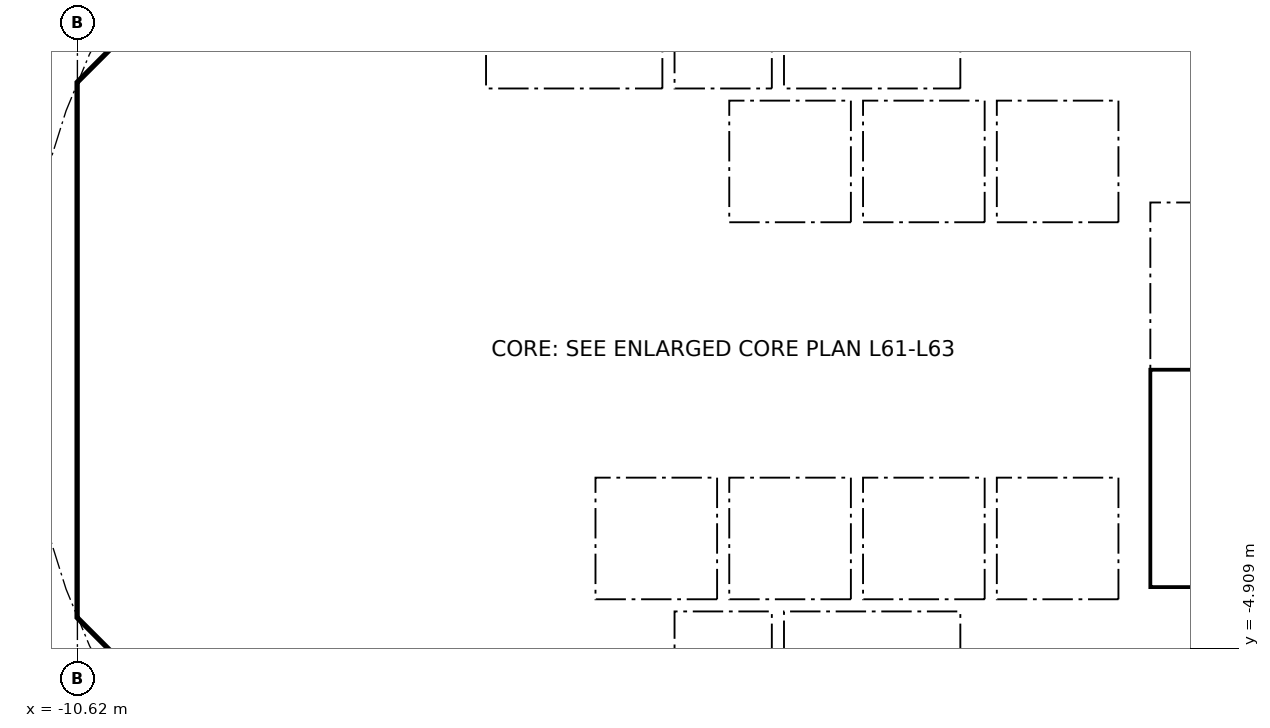
"""IFC4 building model, lengths in metres.
Left out: names, types, materials, properties, quantities, classifications, styles, units other than length and angle.
Written with IfcOpenShell. Run it as: python <this file> out.ifc"""

import sys

from ifc_helpers import new_model, si_unit, direction, frame, frame_2d, origin, place, context, subcontext, project, spatial, polyline, rectangle, outline, extrude, element, fill, save


model = new_model("IFC4")
c1 = context("Model", 3, precision=1e-05, world=origin(), true_north=direction((0.0, 1.0)))
c2 = subcontext(c1, "Body", "Model", "MODEL_VIEW")
j1 = project(units=[si_unit("LENGTHUNIT", "METRE"), si_unit("PLANEANGLEUNIT", "RADIAN")], contexts=[c1])
p1 = place(None, origin())
s1 = spatial("IfcSite", under=j1, at=p1, CompositionType="ELEMENT")
p2 = place(p1, origin())
s2 = spatial("IfcBuilding", under=s1, at=p2, CompositionType="ELEMENT")
p3 = place(p2, frame((0.0, 0.0, 245.5)))
s3 = spatial("IfcBuildingStorey", under=s2, at=p3, CompositionType="ELEMENT", Elevation=245.5)
p4 = place(p3, frame((9.988, 4.613, 0.0), z_axis=(0.0, 0.0, 1.0), x_axis=(-0.707106781187, 0.707106781187, 0.0)))
e1 = element("IfcWall", 1, at=p4, inside=s3, PredefinedType="SHEAR", context=c2, shape_type="SweptSolid", body=[
    extrude(rectangle(XDim=7.602, YDim=0.6, at=frame_2d((3.801, 0.0))), origin(), (0.0, 0.0, 1.0), 3.44),
])
p5 = place(p4, frame((3.201, 0.0, 0.0)))
e2 = element("IfcOpeningElement", 2, at=p5, cuts=e1, PredefinedType="OPENING", context=c2, shape_type="SweptSolid", body=[
    extrude(rectangle(XDim=1.2, YDim=2.1, at=frame_2d((0.6, 1.05))), frame((0.0, 0.31, 0.0), z_axis=(0.0, -1.0, 0.0), x_axis=(1.0, 0.0, 0.0)), (0.0, 0.0, 1.0), 0.62),
])
p6 = place(p3, frame((-4.613, 9.988, 0.0), z_axis=(0.0, 0.0, 1.0), x_axis=(-0.707106781187, -0.707106781187, 0.0)))
e3 = element("IfcWall", 3, at=p6, inside=s3, PredefinedType="SHEAR", context=c2, shape_type="SweptSolid", body=[
    extrude(rectangle(XDim=7.602, YDim=0.6, at=frame_2d((3.801, 0.0))), origin(), (0.0, 0.0, 1.0), 3.44),
])
p7 = place(p6, frame((0.351, 0.0, 0.0)))
e4 = element("IfcOpeningElement", 4, at=p7, cuts=e3, PredefinedType="OPENING", context=c2, shape_type="SweptSolid", body=[
    extrude(rectangle(XDim=1.1, YDim=2.1, at=frame_2d((0.55, 1.05))), frame((0.0, 0.31, 0.0), z_axis=(0.0, -1.0, 0.0), x_axis=(1.0, 0.0, 0.0)), (0.0, 0.0, 1.0), 0.62),
])
p8 = place(p3, frame((-10.325, 3.801, 0.0), z_axis=(0.0, 0.0, 1.0), x_axis=(0.0, -1.0, 0.0)))
e5 = element("IfcWall", 5, at=p8, inside=s3, PredefinedType="SHEAR", context=c2, shape_type="SweptSolid", body=[
    extrude(rectangle(XDim=7.602, YDim=0.6, at=frame_2d((3.801, 0.0))), origin(), (0.0, 0.0, 1.0), 3.44),
])
p9 = place(p8, frame((0.651, 0.0, 0.0)))
e6 = element("IfcOpeningElement", 6, at=p9, cuts=e5, PredefinedType="OPENING", context=c2, shape_type="SweptSolid", body=[
    extrude(rectangle(XDim=1.5, YDim=2.1, at=frame_2d((0.75, 1.05))), frame((0.0, 0.31, 0.0), z_axis=(0.0, -1.0, 0.0), x_axis=(1.0, 0.0, 0.0)), (0.0, 0.0, 1.0), 0.62),
])
p10 = place(p8, frame((5.451, 0.0, 0.0)))
e7 = element("IfcOpeningElement", 7, at=p10, cuts=e5, PredefinedType="OPENING", context=c2, shape_type="SweptSolid", body=[
    extrude(rectangle(XDim=1.5, YDim=2.1, at=frame_2d((0.75, 1.05))), frame((0.0, 0.31, 0.0), z_axis=(0.0, -1.0, 0.0), x_axis=(1.0, 0.0, 0.0)), (0.0, 0.0, 1.0), 0.62),
])
p11 = place(p3, frame((-9.988, -4.613, 0.0), z_axis=(0.0, 0.0, 1.0), x_axis=(0.707106781187, -0.707106781187, 0.0)))
e8 = element("IfcWall", 8, at=p11, inside=s3, PredefinedType="SHEAR", context=c2, shape_type="SweptSolid", body=[
    extrude(rectangle(XDim=7.602, YDim=0.6, at=frame_2d((3.801, 0.0))), origin(), (0.0, 0.0, 1.0), 3.44),
])
p12 = place(p11, frame((6.151, 0.0, 0.0)))
e9 = element("IfcOpeningElement", 9, at=p12, cuts=e8, PredefinedType="OPENING", context=c2, shape_type="SweptSolid", body=[
    extrude(rectangle(XDim=1.1, YDim=2.1, at=frame_2d((0.55, 1.05))), frame((0.0, 0.31, 0.0), z_axis=(0.0, -1.0, 0.0), x_axis=(1.0, 0.0, 0.0)), (0.0, 0.0, 1.0), 0.62),
])
p13 = place(p3, frame((4.613, -9.988, 0.0), z_axis=(0.0, 0.0, 1.0), x_axis=(0.707106781187, 0.707106781187, 0.0)))
e10 = element("IfcWall", 10, at=p13, inside=s3, PredefinedType="SHEAR", context=c2, shape_type="SweptSolid", body=[
    extrude(rectangle(XDim=7.602, YDim=0.6, at=frame_2d((3.801, 0.0))), origin(), (0.0, 0.0, 1.0), 3.44),
])
p14 = place(p13, frame((3.201, 0.0, 0.0)))
e11 = element("IfcOpeningElement", 11, at=p14, cuts=e10, PredefinedType="OPENING", context=c2, shape_type="SweptSolid", body=[
    extrude(rectangle(XDim=1.2, YDim=2.1, at=frame_2d((0.6, 1.05))), frame((0.0, 0.31, 0.0), z_axis=(0.0, -1.0, 0.0), x_axis=(1.0, 0.0, 0.0)), (0.0, 0.0, 1.0), 0.62),
])
p15 = place(p3, frame((-5.8, 4.3, 0.0), z_axis=(0.0, 0.0, 1.0), x_axis=(0.0, 1.0, 0.0)))
e12 = element("IfcWall", 12, at=p15, inside=s3, PredefinedType="PARTITIONING", context=c2, shape_type="SweptSolid", body=[
    extrude(rectangle(XDim=3.927, YDim=0.15, at=frame_2d((1.963, 0.0))), origin(), (0.0, 0.0, 1.0), 3.44),
])
p16 = place(p15, frame((0.413, 0.0, 0.0)))
e13 = element("IfcOpeningElement", 13, at=p16, cuts=e12, PredefinedType="OPENING", context=c2, shape_type="SweptSolid", body=[
    extrude(rectangle(XDim=0.9, YDim=2.1, at=frame_2d((0.45, 1.05))), frame((0.0, 0.085, 0.0), z_axis=(0.0, -1.0, 0.0), x_axis=(1.0, 0.0, 0.0)), (0.0, 0.0, 1.0), 0.17),
])
p17 = place(p15, frame((2.489, 0.0, 0.0)))
e14 = element("IfcOpeningElement", 14, at=p17, cuts=e12, PredefinedType="OPENING", context=c2, shape_type="SweptSolid", body=[
    extrude(rectangle(XDim=0.9, YDim=2.1, at=frame_2d((0.45, 1.05))), frame((0.0, 0.085, 0.0), z_axis=(0.0, -1.0, 0.0), x_axis=(1.0, 0.0, 0.0)), (0.0, 0.0, 1.0), 0.17),
])
p18 = place(p3, frame((4.0, 4.3, 0.0), z_axis=(0.0, 0.0, 1.0), x_axis=(0.0, 1.0, 0.0)))
e15 = element("IfcWall", 15, at=p18, inside=s3, PredefinedType="SOLIDWALL", context=c2, shape_type="SweptSolid", body=[
    extrude(rectangle(XDim=2.2, YDim=0.2, at=frame_2d((1.1, 0.0))), origin(), (0.0, 0.0, 1.0), 3.44),
])
p19 = place(p18, frame((0.55, 0.0, 0.0)))
e16 = element("IfcOpeningElement", 16, at=p19, cuts=e15, PredefinedType="OPENING", context=c2, shape_type="SweptSolid", body=[
    extrude(rectangle(XDim=1.1, YDim=2.1, at=frame_2d((0.55, 1.05))), frame((0.0, 0.11, 0.0), z_axis=(0.0, -1.0, 0.0), x_axis=(1.0, 0.0, 0.0)), (0.0, 0.0, 1.0), 0.22),
])
p20 = place(p3, frame((-4.0, 4.3, 0.0), z_axis=(0.0, 0.0, 1.0), x_axis=(0.0, 1.0, 0.0)))
e17 = element("IfcWall", 17, at=p20, inside=s3, PredefinedType="SOLIDWALL", context=c2, shape_type="SweptSolid", body=[
    extrude(rectangle(XDim=2.2, YDim=0.2, at=frame_2d((1.1, 0.0))), origin(), (0.0, 0.0, 1.0), 3.44),
])
p21 = place(p20, frame((0.55, 0.0, 0.0)))
e18 = element("IfcOpeningElement", 18, at=p21, cuts=e17, PredefinedType="OPENING", context=c2, shape_type="SweptSolid", body=[
    extrude(rectangle(XDim=1.1, YDim=2.1, at=frame_2d((0.55, 1.05))), frame((0.0, 0.11, 0.0), z_axis=(0.0, -1.0, 0.0), x_axis=(1.0, 0.0, 0.0)), (0.0, 0.0, 1.0), 0.22),
])
p22 = place(p3, frame((-6.7, 2.0, 0.0), z_axis=(0.0, 0.0, 1.0), x_axis=(1.0, 0.0, 0.0)))
e19 = element("IfcWall", 19, at=p22, inside=s3, PredefinedType="SOLIDWALL", context=c2, shape_type="SweptSolid", body=[
    extrude(rectangle(XDim=13.4, YDim=0.2, at=frame_2d((6.7, 0.0))), origin(), (0.0, 0.0, 1.0), 3.44),
])
p23 = place(p22, frame((7.25, 0.0, 0.0)))
e20 = element("IfcOpeningElement", 20, at=p23, cuts=e19, PredefinedType="OPENING", context=c2, shape_type="SweptSolid", body=[
    extrude(rectangle(XDim=1.1, YDim=2.1, at=frame_2d((0.55, 1.05))), frame((0.0, 0.11, 0.0), z_axis=(0.0, -1.0, 0.0), x_axis=(1.0, 0.0, 0.0)), (0.0, 0.0, 1.0), 0.22),
])
p24 = place(p22, frame((9.45, 0.0, 0.0)))
e21 = element("IfcOpeningElement", 21, at=p24, cuts=e19, PredefinedType="OPENING", context=c2, shape_type="SweptSolid", body=[
    extrude(rectangle(XDim=1.1, YDim=2.1, at=frame_2d((0.55, 1.05))), frame((0.0, 0.11, 0.0), z_axis=(0.0, -1.0, 0.0), x_axis=(1.0, 0.0, 0.0)), (0.0, 0.0, 1.0), 0.22),
])
p25 = place(p22, frame((0.75, 0.0, 0.0)))
e22 = element("IfcOpeningElement", 22, at=p25, cuts=e19, PredefinedType="OPENING", context=c2, shape_type="SweptSolid", body=[
    extrude(rectangle(XDim=0.9, YDim=2.1, at=frame_2d((0.45, 1.05))), frame((0.0, 0.11, 0.0), z_axis=(0.0, -1.0, 0.0), x_axis=(1.0, 0.0, 0.0)), (0.0, 0.0, 1.0), 0.22),
])
p26 = place(p22, frame((4.05, 0.0, 0.0)))
e23 = element("IfcOpeningElement", 23, at=p26, cuts=e19, PredefinedType="OPENING", context=c2, shape_type="SweptSolid", body=[
    extrude(rectangle(XDim=0.9, YDim=2.1, at=frame_2d((0.45, 1.05))), frame((0.0, 0.11, 0.0), z_axis=(0.0, -1.0, 0.0), x_axis=(1.0, 0.0, 0.0)), (0.0, 0.0, 1.0), 0.22),
])
p27 = place(p3, frame((6.7, 4.0, 0.0), z_axis=(0.0, 0.0, 1.0), x_axis=(1.0, 0.0, 0.0)))
e24 = element("IfcWall", 24, at=p27, inside=s3, PredefinedType="SOLIDWALL", context=c2, shape_type="SweptSolid", body=[
    extrude(rectangle(XDim=3.325, YDim=0.2, at=frame_2d((1.662, 0.0))), origin(), (0.0, 0.0, 1.0), 3.44),
])
p28 = place(p27, frame((1.25, 0.0, 0.0)))
e25 = element("IfcOpeningElement", 25, at=p28, cuts=e24, PredefinedType="OPENING", context=c2, shape_type="SweptSolid", body=[
    extrude(rectangle(XDim=1.1, YDim=2.1, at=frame_2d((0.55, 1.05))), frame((0.0, 0.11, 0.0), z_axis=(0.0, -1.0, 0.0), x_axis=(1.0, 0.0, 0.0)), (0.0, 0.0, 1.0), 0.22),
])
p29 = place(p3, frame((-5.8, -8.227, 0.0), z_axis=(0.0, 0.0, 1.0), x_axis=(0.0, 1.0, 0.0)))
e26 = element("IfcWall", 26, at=p29, inside=s3, PredefinedType="PARTITIONING", context=c2, shape_type="SweptSolid", body=[
    extrude(rectangle(XDim=3.927, YDim=0.15, at=frame_2d((1.963, 0.0))), origin(), (0.0, 0.0, 1.0), 3.44),
])
p30 = place(p29, frame((2.615, 0.0, 0.0)))
e27 = element("IfcOpeningElement", 27, at=p30, cuts=e26, PredefinedType="OPENING", context=c2, shape_type="SweptSolid", body=[
    extrude(rectangle(XDim=0.9, YDim=2.1, at=frame_2d((0.45, 1.05))), frame((0.0, 0.085, 0.0), z_axis=(0.0, -1.0, 0.0), x_axis=(1.0, 0.0, 0.0)), (0.0, 0.0, 1.0), 0.17),
])
p31 = place(p29, frame((0.539, 0.0, 0.0)))
e28 = element("IfcOpeningElement", 28, at=p31, cuts=e26, PredefinedType="OPENING", context=c2, shape_type="SweptSolid", body=[
    extrude(rectangle(XDim=0.9, YDim=2.1, at=frame_2d((0.45, 1.05))), frame((0.0, 0.085, 0.0), z_axis=(0.0, -1.0, 0.0), x_axis=(1.0, 0.0, 0.0)), (0.0, 0.0, 1.0), 0.17),
])
p32 = place(p3, frame((4.0, -6.5, 0.0), z_axis=(0.0, 0.0, 1.0), x_axis=(0.0, 1.0, 0.0)))
e29 = element("IfcWall", 29, at=p32, inside=s3, PredefinedType="SOLIDWALL", context=c2, shape_type="SweptSolid", body=[
    extrude(rectangle(XDim=2.2, YDim=0.2, at=frame_2d((1.1, 0.0))), origin(), (0.0, 0.0, 1.0), 3.44),
])
p33 = place(p32, frame((0.55, 0.0, 0.0)))
e30 = element("IfcOpeningElement", 30, at=p33, cuts=e29, PredefinedType="OPENING", context=c2, shape_type="SweptSolid", body=[
    extrude(rectangle(XDim=1.1, YDim=2.1, at=frame_2d((0.55, 1.05))), frame((0.0, 0.11, 0.0), z_axis=(0.0, -1.0, 0.0), x_axis=(1.0, 0.0, 0.0)), (0.0, 0.0, 1.0), 0.22),
])
p34 = place(p3, frame((-4.0, -6.5, 0.0), z_axis=(0.0, 0.0, 1.0), x_axis=(0.0, 1.0, 0.0)))
e31 = element("IfcWall", 31, at=p34, inside=s3, PredefinedType="SOLIDWALL", context=c2, shape_type="SweptSolid", body=[
    extrude(rectangle(XDim=2.2, YDim=0.2, at=frame_2d((1.1, 0.0))), origin(), (0.0, 0.0, 1.0), 3.44),
])
p35 = place(p34, frame((0.65, 0.0, 0.0)))
e32 = element("IfcOpeningElement", 32, at=p35, cuts=e31, PredefinedType="OPENING", context=c2, shape_type="SweptSolid", body=[
    extrude(rectangle(XDim=0.9, YDim=2.1, at=frame_2d((0.45, 1.05))), frame((0.0, 0.11, 0.0), z_axis=(0.0, -1.0, 0.0), x_axis=(1.0, 0.0, 0.0)), (0.0, 0.0, 1.0), 0.22),
])
p36 = place(p3, frame((-6.7, -2.0, 0.0), z_axis=(0.0, 0.0, 1.0), x_axis=(1.0, 0.0, 0.0)))
e33 = element("IfcWall", 33, at=p36, inside=s3, PredefinedType="SOLIDWALL", context=c2, shape_type="SweptSolid", body=[
    extrude(rectangle(XDim=13.4, YDim=0.2, at=frame_2d((6.7, 0.0))), origin(), (0.0, 0.0, 1.0), 3.44),
])
p37 = place(p36, frame((5.05, 0.0, 0.0)))
e34 = element("IfcOpeningElement", 34, at=p37, cuts=e33, PredefinedType="OPENING", context=c2, shape_type="SweptSolid", body=[
    extrude(rectangle(XDim=1.1, YDim=2.1, at=frame_2d((0.55, 1.05))), frame((0.0, 0.11, 0.0), z_axis=(0.0, -1.0, 0.0), x_axis=(1.0, 0.0, 0.0)), (0.0, 0.0, 1.0), 0.22),
])
p38 = place(p36, frame((7.25, 0.0, 0.0)))
e35 = element("IfcOpeningElement", 35, at=p38, cuts=e33, PredefinedType="OPENING", context=c2, shape_type="SweptSolid", body=[
    extrude(rectangle(XDim=1.1, YDim=2.1, at=frame_2d((0.55, 1.05))), frame((0.0, 0.11, 0.0), z_axis=(0.0, -1.0, 0.0), x_axis=(1.0, 0.0, 0.0)), (0.0, 0.0, 1.0), 0.22),
])
p39 = place(p36, frame((1.85, 0.0, 0.0)))
e36 = element("IfcOpeningElement", 36, at=p39, cuts=e33, PredefinedType="OPENING", context=c2, shape_type="SweptSolid", body=[
    extrude(rectangle(XDim=0.9, YDim=2.1, at=frame_2d((0.45, 1.05))), frame((0.0, 0.11, 0.0), z_axis=(0.0, -1.0, 0.0), x_axis=(1.0, 0.0, 0.0)), (0.0, 0.0, 1.0), 0.22),
])
p40 = place(p3, origin())
e37 = element("IfcWall", 37, at=p40, inside=s3, PredefinedType="SHEAR", context=c2, shape_type="SweptSolid", body=[
    extrude(outline(polyline([(-10.625, -3.801), (-10.025, -3.801), (-10.025, -4.152), (-9.776, -4.401), (-10.2, -4.825), (-10.625, -4.401), (-10.625, -3.801)])), origin(), (0.0, 0.0, 1.0), 3.44),
])
p41 = place(p3, origin())
e38 = element("IfcWall", 38, at=p41, inside=s3, PredefinedType="SHEAR", context=c2, shape_type="SweptSolid", body=[
    extrude(outline(polyline([(-10.2, 4.825), (-9.776, 4.401), (-10.025, 4.152), (-10.025, 3.801), (-10.625, 3.801), (-10.625, 4.401), (-10.2, 4.825)])), origin(), (0.0, 0.0, 1.0), 3.44),
])
for number, where, z_axis, x_axis in (
    (39, (-10.025, -4.0, 0.0), (0.0, 0.0, 1.0), (1.0, 0.0, 0.0)),
    (40, (-10.025, 4.0, 0.0), (0.0, 0.0, 1.0), (1.0, 0.0, 0.0)),
):
    element("IfcWall", number, at=place(p3, frame(where, z_axis=z_axis, x_axis=x_axis)), inside=s3, PredefinedType="PARTITIONING", context=c2, shape_type="SweptSolid", body=[
        extrude(rectangle(XDim=3.325, YDim=0.2, at=frame_2d((1.662, 0.0))), origin(), (0.0, 0.0, 1.0), 3.44),
    ])
for number, where, z_axis, x_axis in (
    (41, (-0.9, 4.3, 0.0), (0.0, 0.0, 1.0), (0.0, 1.0, 0.0)),
    (42, (0.9, 4.3, 0.0), (0.0, 0.0, 1.0), (0.0, 1.0, 0.0)),
):
    element("IfcWall", number, at=place(p3, frame(where, z_axis=z_axis, x_axis=x_axis)), inside=s3, PredefinedType="SOLIDWALL", context=c2, shape_type="SweptSolid", body=[
        extrude(rectangle(XDim=2.2, YDim=0.2, at=frame_2d((1.1, 0.0))), origin(), (0.0, 0.0, 1.0), 3.44),
    ])
p42 = place(p3, origin())
e43 = element("IfcWall", 43, at=p42, inside=s3, PredefinedType="SOLIDWALL", context=c2, shape_type="SweptSolid", body=[
    extrude(outline(polyline([(-6.7, 4.3), (6.7, 4.3), (6.7, 2.1), (6.5, 2.1), (6.5, 4.1), (4.5, 4.1), (4.5, 2.1), (4.3, 2.1), (4.3, 4.1), (2.3, 4.1), (2.3, 2.1), (2.1, 2.1), (2.1, 4.1), (0.1, 4.1), (0.1, 2.1), (-0.1, 2.1), (-0.1, 4.1), (-4.3, 4.1), (-4.3, 2.1), (-4.5, 2.1), (-4.5, 4.1), (-6.5, 4.1), (-6.5, 2.1), (-6.7, 2.1), (-6.7, 4.3)])), origin(), (0.0, 0.0, 1.0), 3.44),
])
for number, where, z_axis, x_axis in (
    (44, (-0.9, -6.5, 0.0), (0.0, 0.0, 1.0), (0.0, 1.0, 0.0)),
    (45, (0.9, -6.5, 0.0), (0.0, 0.0, 1.0), (0.0, 1.0, 0.0)),
):
    element("IfcWall", number, at=place(p3, frame(where, z_axis=z_axis, x_axis=x_axis)), inside=s3, PredefinedType="SOLIDWALL", context=c2, shape_type="SweptSolid", body=[
        extrude(rectangle(XDim=2.2, YDim=0.2, at=frame_2d((1.1, 0.0))), origin(), (0.0, 0.0, 1.0), 3.44),
    ])
p43 = place(p3, origin())
e46 = element("IfcWall", 46, at=p43, inside=s3, PredefinedType="SOLIDWALL", context=c2, shape_type="SweptSolid", body=[
    extrude(outline(polyline([(-6.7, -2.1), (-6.5, -2.1), (-6.5, -4.1), (-2.3, -4.1), (-2.3, -2.1), (-2.1, -2.1), (-2.1, -4.1), (-0.1, -4.1), (-0.1, -2.1), (0.1, -2.1), (0.1, -4.1), (2.1, -4.1), (2.1, -2.1), (2.3, -2.1), (2.3, -4.1), (4.3, -4.1), (4.3, -2.1), (4.5, -2.1), (4.5, -4.1), (6.5, -4.1), (6.5, -2.1), (6.7, -2.1), (6.7, -4.3), (-6.7, -4.3), (-6.7, -2.1)])), origin(), (0.0, 0.0, 1.0), 3.44),
])
p44 = place(p3, origin())
e47 = element("IfcWall", 47, at=p44, inside=s3, PredefinedType="SOLIDWALL", context=c2, shape_type="SweptSolid", body=[
    extrude(outline(polyline([(7.025, -3.9), (6.7, -3.9), (6.7, 3.9), (7.025, 3.9), (7.025, -3.9)])), origin(), (0.0, 0.0, 1.0), 3.44),
])
p45 = place(p3, origin())
e48 = element("IfcWall", 48, at=p45, inside=s3, PredefinedType="SOLIDWALL", context=c2, shape_type="SweptSolid", body=[
    extrude(outline(polyline([(10.025, -4.1), (6.7, -4.1), (6.7, -3.9), (10.025, -3.9), (10.025, -4.1)])), origin(), (0.0, 0.0, 1.0), 3.44),
])
p46 = place(p23, origin())
e49 = element("IfcDoor", 49, at=p46, inside=s3, OperationType="DOUBLE_DOOR_SLIDING", PredefinedType="DOOR", context=c2, shape_type="SweptSolid", body=[
    extrude(rectangle(XDim=1.1, YDim=2.1, at=frame_2d((0.55, 1.05))), frame((0.0, 0.025, 0.0), z_axis=(0.0, -1.0, 0.0), x_axis=(1.0, 0.0, 0.0)), (0.0, 0.0, 1.0), 0.05),
])
fill(e20, e49)
p47 = place(p24, origin())
e50 = element("IfcDoor", 50, at=p47, inside=s3, OperationType="DOUBLE_DOOR_SLIDING", PredefinedType="DOOR", context=c2, shape_type="SweptSolid", body=[
    extrude(rectangle(XDim=1.1, YDim=2.1, at=frame_2d((0.55, 1.05))), frame((0.0, 0.025, 0.0), z_axis=(0.0, -1.0, 0.0), x_axis=(1.0, 0.0, 0.0)), (0.0, 0.0, 1.0), 0.05),
])
fill(e21, e50)
p48 = place(p37, origin())
e51 = element("IfcDoor", 51, at=p48, inside=s3, OperationType="DOUBLE_DOOR_SLIDING", PredefinedType="DOOR", context=c2, shape_type="SweptSolid", body=[
    extrude(rectangle(XDim=1.1, YDim=2.1, at=frame_2d((0.55, 1.05))), frame((0.0, 0.025, 0.0), z_axis=(0.0, -1.0, 0.0), x_axis=(1.0, 0.0, 0.0)), (0.0, 0.0, 1.0), 0.05),
])
fill(e34, e51)
p49 = place(p38, origin())
e52 = element("IfcDoor", 52, at=p49, inside=s3, OperationType="DOUBLE_DOOR_SLIDING", PredefinedType="DOOR", context=c2, shape_type="SweptSolid", body=[
    extrude(rectangle(XDim=1.1, YDim=2.1, at=frame_2d((0.55, 1.05))), frame((0.0, 0.025, 0.0), z_axis=(0.0, -1.0, 0.0), x_axis=(1.0, 0.0, 0.0)), (0.0, 0.0, 1.0), 0.05),
])
fill(e35, e52)
p50 = place(p19, origin())
e53 = element("IfcDoor", 53, at=p50, inside=s3, OperationType="DOUBLE_DOOR_SLIDING", PredefinedType="DOOR", context=c2, shape_type="SweptSolid", body=[
    extrude(rectangle(XDim=1.1, YDim=2.1, at=frame_2d((0.55, 1.05))), frame((0.0, 0.025, 0.0), z_axis=(0.0, -1.0, 0.0), x_axis=(1.0, 0.0, 0.0)), (0.0, 0.0, 1.0), 0.05),
])
fill(e16, e53)
p51 = place(p33, origin())
e54 = element("IfcDoor", 54, at=p51, inside=s3, OperationType="DOUBLE_DOOR_SLIDING", PredefinedType="DOOR", context=c2, shape_type="SweptSolid", body=[
    extrude(rectangle(XDim=1.1, YDim=2.1, at=frame_2d((0.55, 1.05))), frame((0.0, 0.025, 0.0), z_axis=(0.0, -1.0, 0.0), x_axis=(1.0, 0.0, 0.0)), (0.0, 0.0, 1.0), 0.05),
])
fill(e30, e54)
p52 = place(p21, origin())
e55 = element("IfcDoor", 55, at=p52, inside=s3, OperationType="DOUBLE_DOOR_SLIDING", PredefinedType="DOOR", context=c2, shape_type="SweptSolid", body=[
    extrude(rectangle(XDim=1.1, YDim=2.1, at=frame_2d((0.55, 1.05))), frame((0.0, 0.025, 0.0), z_axis=(0.0, -1.0, 0.0), x_axis=(1.0, 0.0, 0.0)), (0.0, 0.0, 1.0), 0.05),
])
fill(e18, e55)
p53 = place(p16, origin())
e56 = element("IfcDoor", 56, at=p53, inside=s3, OperationType="SINGLE_SWING_LEFT", PredefinedType="DOOR", context=c2, shape_type="SweptSolid", body=[
    extrude(rectangle(XDim=0.9, YDim=2.1, at=frame_2d((0.45, 1.05))), frame((0.0, 0.025, 0.0), z_axis=(0.0, -1.0, 0.0), x_axis=(1.0, 0.0, 0.0)), (0.0, 0.0, 1.0), 0.05),
])
fill(e13, e56)
p54 = place(p30, origin())
e57 = element("IfcDoor", 57, at=p54, inside=s3, OperationType="SINGLE_SWING_LEFT", PredefinedType="DOOR", context=c2, shape_type="SweptSolid", body=[
    extrude(rectangle(XDim=0.9, YDim=2.1, at=frame_2d((0.45, 1.05))), frame((0.0, 0.025, 0.0), z_axis=(0.0, -1.0, 0.0), x_axis=(1.0, 0.0, 0.0)), (0.0, 0.0, 1.0), 0.05),
])
fill(e27, e57)
p55 = place(p25, origin())
e58 = element("IfcDoor", 58, at=p55, inside=s3, OperationType="SINGLE_SWING_RIGHT", PredefinedType="DOOR", context=c2, shape_type="SweptSolid", body=[
    extrude(rectangle(XDim=0.9, YDim=2.1, at=frame_2d((0.45, 1.05))), frame((0.0, 0.025, 0.0), z_axis=(0.0, -1.0, 0.0), x_axis=(1.0, 0.0, 0.0)), (0.0, 0.0, 1.0), 0.05),
])
fill(e22, e58)
p56 = place(p26, origin())
e59 = element("IfcDoor", 59, at=p56, inside=s3, OperationType="SINGLE_SWING_RIGHT", PredefinedType="DOOR", context=c2, shape_type="SweptSolid", body=[
    extrude(rectangle(XDim=0.9, YDim=2.1, at=frame_2d((0.45, 1.05))), frame((0.0, 0.025, 0.0), z_axis=(0.0, -1.0, 0.0), x_axis=(1.0, 0.0, 0.0)), (0.0, 0.0, 1.0), 0.05),
])
fill(e23, e59)
p57 = place(p39, frame((0.9, 0.0, 0.0), x_axis=(-1.0, 0.0, 0.0)))
e60 = element("IfcDoor", 60, at=p57, inside=s3, OperationType="SINGLE_SWING_LEFT", PredefinedType="DOOR", context=c2, shape_type="SweptSolid", body=[
    extrude(rectangle(XDim=0.9, YDim=2.1, at=frame_2d((0.45, 1.05))), frame((0.0, 0.025, 0.0), z_axis=(0.0, -1.0, 0.0), x_axis=(1.0, 0.0, 0.0)), (0.0, 0.0, 1.0), 0.05),
])
fill(e36, e60)
p58 = place(p9, origin())
e61 = element("IfcDoor", 61, at=p58, inside=s3, OperationType="DOUBLE_DOOR_SINGLE_SWING", PredefinedType="DOOR", context=c2, shape_type="SweptSolid", body=[
    extrude(rectangle(XDim=1.5, YDim=2.1, at=frame_2d((0.75, 1.05))), frame((0.0, 0.025, 0.0), z_axis=(0.0, -1.0, 0.0), x_axis=(1.0, 0.0, 0.0)), (0.0, 0.0, 1.0), 0.05),
])
fill(e6, e61)
p59 = place(p10, origin())
e62 = element("IfcDoor", 62, at=p59, inside=s3, OperationType="DOUBLE_DOOR_SINGLE_SWING", PredefinedType="DOOR", context=c2, shape_type="SweptSolid", body=[
    extrude(rectangle(XDim=1.5, YDim=2.1, at=frame_2d((0.75, 1.05))), frame((0.0, 0.025, 0.0), z_axis=(0.0, -1.0, 0.0), x_axis=(1.0, 0.0, 0.0)), (0.0, 0.0, 1.0), 0.05),
])
fill(e7, e62)
save(model, sys.argv[1])
